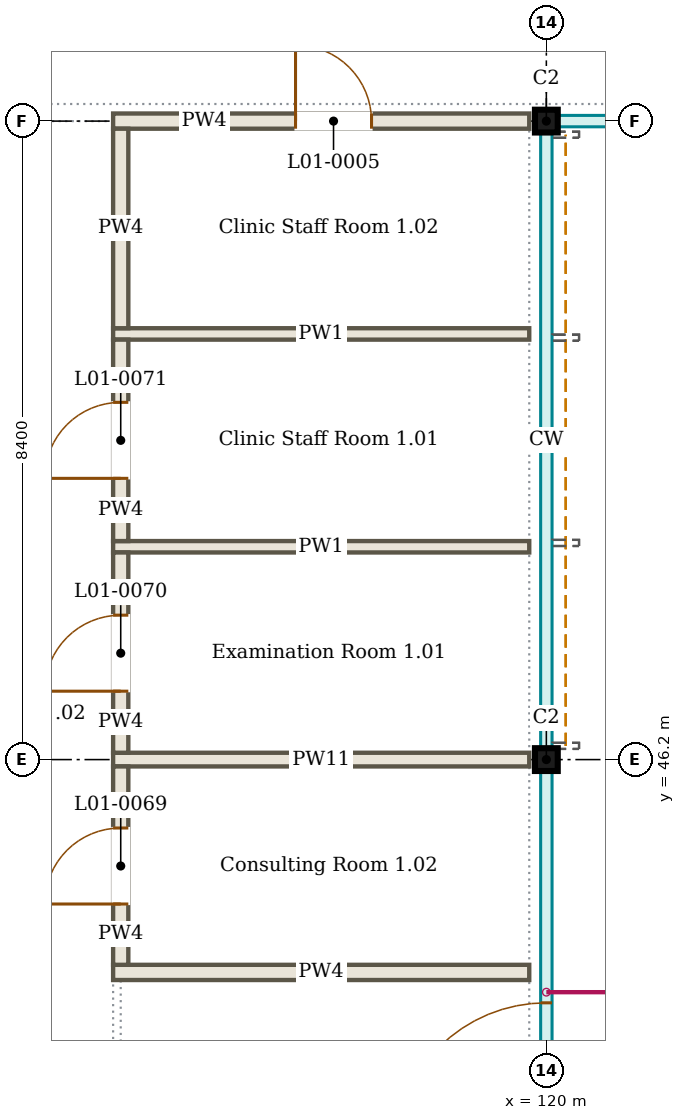
"""IFC4 building model, lengths in metres.
Left out: names, types, materials, properties, quantities, classifications, styles, units other than length and angle.
Written with IfcOpenShell. Run it as: python <this file> out.ifc"""

import sys

from ifc_helpers import new_model, si_unit, direction, frame, frame_2d, origin, origin_2d, place, context, subcontext, project, spatial, rectangle, i_section, extrude, element, fill, save


model = new_model("IFC4")
c1 = context("Model", 3, precision=1e-05, world=origin(), true_north=direction((0.0, 1.0)))
c2 = subcontext(c1, "Body", "Model", "MODEL_VIEW")
j1 = project(units=[si_unit("LENGTHUNIT", "METRE"), si_unit("PLANEANGLEUNIT", "RADIAN")], contexts=[c1])
p1 = place(None, origin())
s1 = spatial("IfcSite", under=j1, at=p1, CompositionType="ELEMENT")
p2 = place(p1, origin())
s2 = spatial("IfcBuilding", under=s1, at=p2, CompositionType="ELEMENT")
p3 = place(p2, frame((0.0, 0.0, 4.5)))
s3 = spatial("IfcBuildingStorey", under=s2, at=p3, CompositionType="ELEMENT", Elevation=4.5)
for number, where, z_axis, x_axis in (
    (1, (120.0, 46.2, 0.0), (0.0, 0.0, 1.0), (1.0, 0.0, 0.0)),
    (2, (120.0, 54.6, 0.0), (0.0, 0.0, 1.0), (1.0, 0.0, 0.0)),
):
    element("IfcColumn", number, at=place(p3, frame(where, z_axis=z_axis, x_axis=x_axis)), inside=s3, PredefinedType="COLUMN", context=c2, shape_type="SweptSolid", body=[
        extrude(i_section(OverallWidth=0.3, OverallDepth=0.3, WebThickness=0.011, FlangeThickness=0.019, FilletRadius=0.027, at=origin_2d()), origin(), (0.0, 0.0, 1.0), 4.5),
    ])
p4 = place(p3, frame((114.3, 43.4, 0.0), z_axis=(0.0, 0.0, 1.0), x_axis=(1.0, 0.0, 0.0)))
e3 = element("IfcWall", 3, at=p4, inside=s3, PredefinedType="PARTITIONING", context=c2, shape_type="SweptSolid", body=[
    extrude(rectangle(XDim=5.475, YDim=0.2, at=frame_2d((2.737, 0.0))), origin(), (0.0, 0.0, 1.0), 3.996),
])
p5 = place(p3, frame((114.3, 46.2, 0.0), z_axis=(0.0, 0.0, 1.0), x_axis=(1.0, 0.0, 0.0)))
e4 = element("IfcWall", 4, at=p5, inside=s3, PredefinedType="PARTITIONING", context=c2, shape_type="SweptSolid", body=[
    extrude(rectangle(XDim=5.475, YDim=0.18, at=frame_2d((2.737, 0.0))), origin(), (0.0, 0.0, 1.0), 3.9),
])
for number, where, z_axis, x_axis in (
    (5, (114.3, 49.0, 0.0), (0.0, 0.0, 1.0), (1.0, 0.0, 0.0)),
    (6, (114.3, 51.8, 0.0), (0.0, 0.0, 1.0), (1.0, 0.0, 0.0)),
):
    element("IfcWall", number, at=place(p3, frame(where, z_axis=z_axis, x_axis=x_axis)), inside=s3, PredefinedType="PARTITIONING", context=c2, shape_type="SweptSolid", body=[
        extrude(rectangle(XDim=5.475, YDim=0.15, at=frame_2d((2.737, 0.0))), origin(), (0.0, 0.0, 1.0), 3.996),
    ])
p6 = place(p3, frame((114.3, 54.6, 0.0), z_axis=(0.0, 0.0, 1.0), x_axis=(1.0, 0.0, 0.0)))
e7 = element("IfcWall", 7, at=p6, inside=s3, PredefinedType="PARTITIONING", context=c2, shape_type="SweptSolid", body=[
    extrude(rectangle(XDim=5.475, YDim=0.2, at=frame_2d((2.737, 0.0))), origin(), (0.0, 0.0, 1.0), 3.9),
])
p7 = place(p6, frame((2.4, 0.0, 0.0)))
e8 = element("IfcOpeningElement", 8, at=p7, cuts=e7, PredefinedType="OPENING", context=c2, shape_type="SweptSolid", body=[
    extrude(rectangle(XDim=1.0, YDim=2.1, at=frame_2d((0.5, 1.05))), frame((0.0, 0.11, 0.0), z_axis=(0.0, -1.0, 0.0), x_axis=(1.0, 0.0, 0.0)), (0.0, 0.0, 1.0), 0.22),
])
p8 = place(p3, frame((114.4, 43.5, 0.0), z_axis=(0.0, 0.0, 1.0), x_axis=(0.0, 1.0, 0.0)))
e9 = element("IfcWall", 9, at=p8, inside=s3, PredefinedType="PARTITIONING", context=c2, shape_type="SweptSolid", body=[
    extrude(rectangle(XDim=2.61, YDim=0.2, at=frame_2d((1.305, 0.0))), origin(), (0.0, 0.0, 1.0), 3.996),
])
p9 = place(p8, frame((0.8, 0.0, 0.0)))
e10 = element("IfcOpeningElement", 10, at=p9, cuts=e9, PredefinedType="OPENING", context=c2, shape_type="SweptSolid", body=[
    extrude(rectangle(XDim=1.0, YDim=2.1, at=frame_2d((0.5, 1.05))), frame((0.0, 0.11, 0.0), z_axis=(0.0, -1.0, 0.0), x_axis=(1.0, 0.0, 0.0)), (0.0, 0.0, 1.0), 0.22),
])
p10 = place(p3, frame((114.4, 46.29, 0.0), z_axis=(0.0, 0.0, 1.0), x_axis=(0.0, 1.0, 0.0)))
e11 = element("IfcWall", 11, at=p10, inside=s3, PredefinedType="PARTITIONING", context=c2, shape_type="SweptSolid", body=[
    extrude(rectangle(XDim=2.635, YDim=0.2, at=frame_2d((1.317, 0.0))), origin(), (0.0, 0.0, 1.0), 3.996),
])
p11 = place(p10, frame((0.81, 0.0, 0.0)))
e12 = element("IfcOpeningElement", 12, at=p11, cuts=e11, PredefinedType="OPENING", context=c2, shape_type="SweptSolid", body=[
    extrude(rectangle(XDim=1.0, YDim=2.1, at=frame_2d((0.5, 1.05))), frame((0.0, 0.11, 0.0), z_axis=(0.0, -1.0, 0.0), x_axis=(1.0, 0.0, 0.0)), (0.0, 0.0, 1.0), 0.22),
])
p12 = place(p3, frame((114.4, 49.075, 0.0), z_axis=(0.0, 0.0, 1.0), x_axis=(0.0, 1.0, 0.0)))
e13 = element("IfcWall", 13, at=p12, inside=s3, PredefinedType="PARTITIONING", context=c2, shape_type="SweptSolid", body=[
    extrude(rectangle(XDim=2.65, YDim=0.2, at=frame_2d((1.325, 0.0))), origin(), (0.0, 0.0, 1.0), 3.996),
])
p13 = place(p12, frame((0.825, 0.0, 0.0)))
e14 = element("IfcOpeningElement", 14, at=p13, cuts=e13, PredefinedType="OPENING", context=c2, shape_type="SweptSolid", body=[
    extrude(rectangle(XDim=1.0, YDim=2.1, at=frame_2d((0.5, 1.05))), frame((0.0, 0.11, 0.0), z_axis=(0.0, -1.0, 0.0), x_axis=(1.0, 0.0, 0.0)), (0.0, 0.0, 1.0), 0.22),
])
p14 = place(p3, frame((114.4, 51.875, 0.0), z_axis=(0.0, 0.0, 1.0), x_axis=(0.0, 1.0, 0.0)))
e15 = element("IfcWall", 15, at=p14, inside=s3, PredefinedType="PARTITIONING", context=c2, shape_type="SweptSolid", body=[
    extrude(rectangle(XDim=2.625, YDim=0.2, at=frame_2d((1.312, 0.0))), origin(), (0.0, 0.0, 1.0), 3.996),
])
p15 = place(p3, frame((120.0, 37.8, 0.0), z_axis=(0.0, 0.0, 1.0), x_axis=(0.0, 1.0, 0.0)))
p16 = place(p15, frame((3.2, 0.0, 0.0)))
p17 = place(p16, origin())
e16 = element("IfcDoor", 16, at=p17, inside=s3, OperationType="SINGLE_SWING_LEFT", PredefinedType="DOOR", context=c2, shape_type="SweptSolid", body=[
    extrude(rectangle(XDim=2.0, YDim=2.4, at=frame_2d((1.0, 1.2))), frame((0.0, 0.025, 0.0), z_axis=(0.0, -1.0, 0.0), x_axis=(1.0, 0.0, 0.0)), (0.0, 0.0, 1.0), 0.05),
])
p18 = place(p7, origin())
e17 = element("IfcDoor", 17, at=p18, inside=s3, OperationType="SINGLE_SWING_LEFT", PredefinedType="DOOR", context=c2, shape_type="SweptSolid", body=[
    extrude(rectangle(XDim=1.0, YDim=2.1, at=frame_2d((0.5, 1.05))), frame((0.0, 0.025, 0.0), z_axis=(0.0, -1.0, 0.0), x_axis=(1.0, 0.0, 0.0)), (0.0, 0.0, 1.0), 0.05),
])
fill(e8, e17)
p19 = place(p9, origin())
e18 = element("IfcDoor", 18, at=p19, inside=s3, OperationType="SINGLE_SWING_LEFT", PredefinedType="DOOR", context=c2, shape_type="SweptSolid", body=[
    extrude(rectangle(XDim=1.0, YDim=2.1, at=frame_2d((0.5, 1.05))), frame((0.0, 0.025, 0.0), z_axis=(0.0, -1.0, 0.0), x_axis=(1.0, 0.0, 0.0)), (0.0, 0.0, 1.0), 0.05),
])
fill(e10, e18)
p20 = place(p11, origin())
e19 = element("IfcDoor", 19, at=p20, inside=s3, OperationType="SINGLE_SWING_LEFT", PredefinedType="DOOR", context=c2, shape_type="SweptSolid", body=[
    extrude(rectangle(XDim=1.0, YDim=2.1, at=frame_2d((0.5, 1.05))), frame((0.0, 0.025, 0.0), z_axis=(0.0, -1.0, 0.0), x_axis=(1.0, 0.0, 0.0)), (0.0, 0.0, 1.0), 0.05),
])
fill(e12, e19)
p21 = place(p13, origin())
e20 = element("IfcDoor", 20, at=p21, inside=s3, OperationType="SINGLE_SWING_LEFT", PredefinedType="DOOR", context=c2, shape_type="SweptSolid", body=[
    extrude(rectangle(XDim=1.0, YDim=2.1, at=frame_2d((0.5, 1.05))), frame((0.0, 0.025, 0.0), z_axis=(0.0, -1.0, 0.0), x_axis=(1.0, 0.0, 0.0)), (0.0, 0.0, 1.0), 0.05),
])
fill(e14, e20)
save(model, sys.argv[1])
